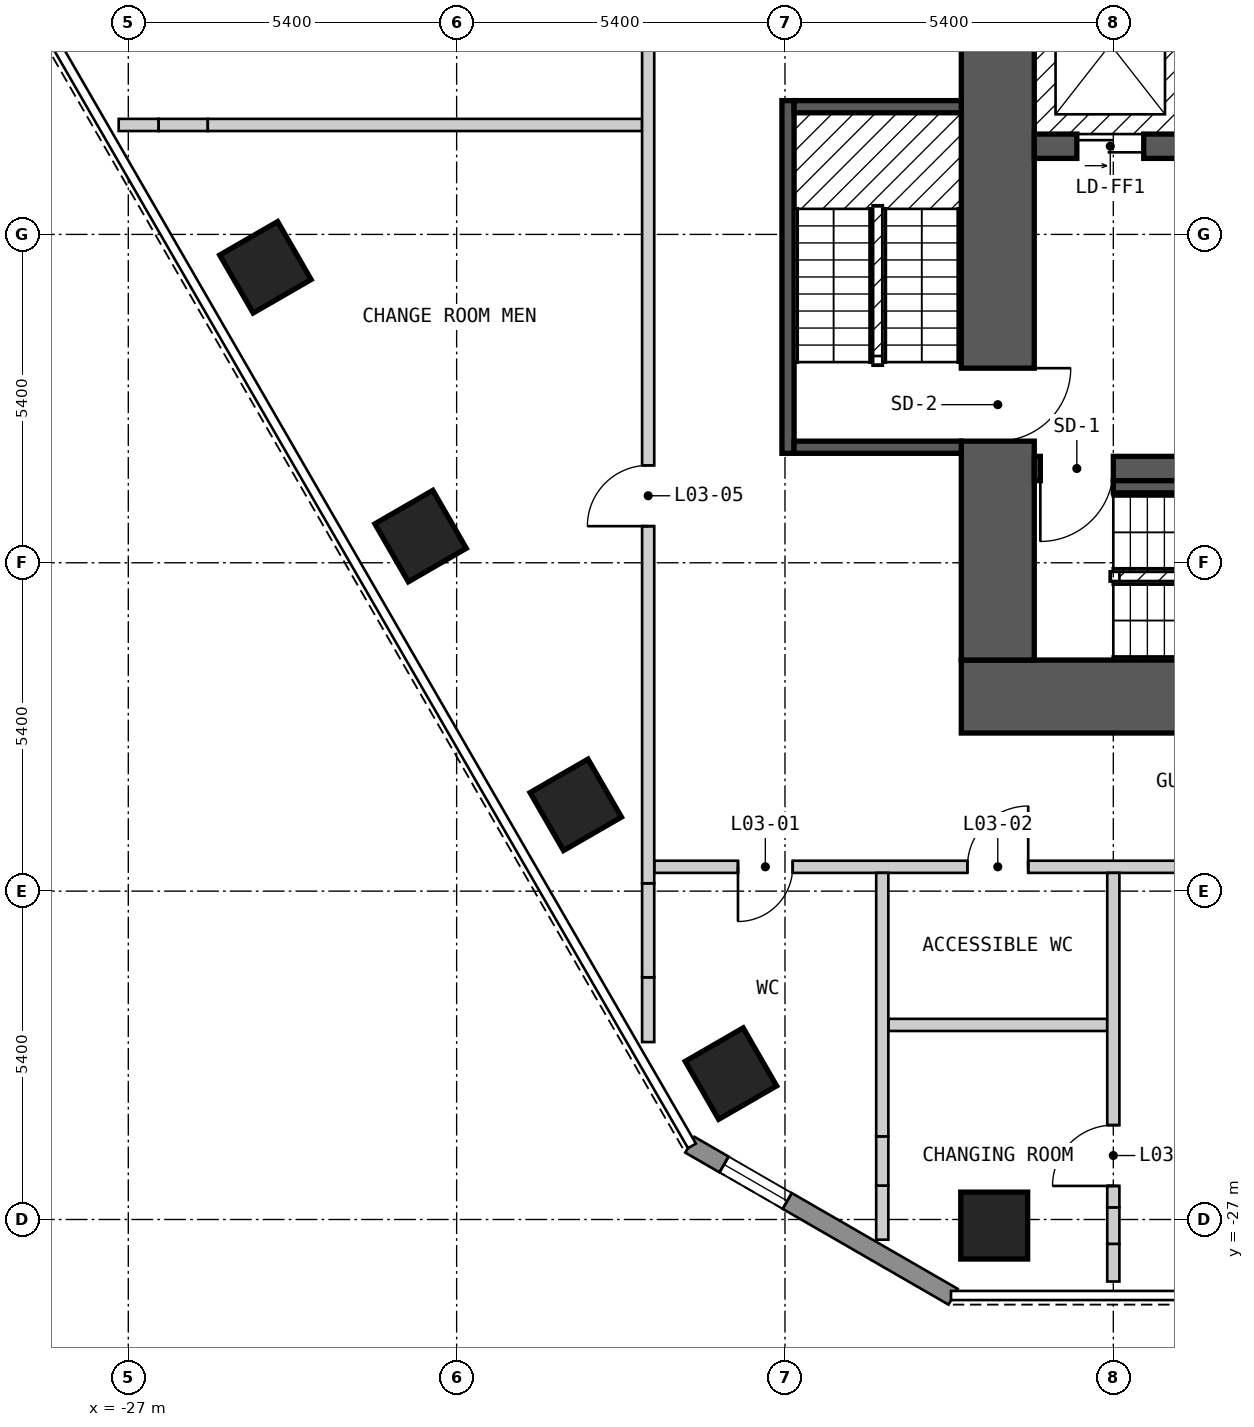
"""IFC4 building model, lengths in metres.
Left out: names, types, materials, properties, quantities, classifications, styles, units other than length and angle.
Written with IfcOpenShell. Run it as: python <this file> out.ifc"""

import sys

from ifc_helpers import new_model, si_unit, direction, frame, frame_2d, origin, origin_2d, place, context, subcontext, project, spatial, polyline, rectangle, outline, extrude, element, fill, save


model = new_model("IFC4")
c1 = context("Model", 3, precision=1e-05, world=origin(), true_north=direction((0.0, 1.0)))
c2 = subcontext(c1, "Body", "Model", "MODEL_VIEW")
j1 = project(units=[si_unit("LENGTHUNIT", "METRE"), si_unit("PLANEANGLEUNIT", "RADIAN")], contexts=[c1])
p1 = place(None, origin())
s1 = spatial("IfcSite", under=j1, at=p1, CompositionType="ELEMENT")
p2 = place(p1, origin())
s2 = spatial("IfcBuilding", under=s1, at=p2, CompositionType="ELEMENT")
p3 = place(p2, frame((0.0, 0.0, 12.6)))
s3 = spatial("IfcBuildingStorey", under=s2, at=p3, CompositionType="ELEMENT", Elevation=12.6)
for number, where, z_axis, x_axis in (
    (1, (-24.745, -11.341, 0.0), (0.0, 0.0, 1.0), (0.5, -0.866, 0.0)),
    (2, (-22.193, -15.761, 0.0), (0.0, 0.0, 1.0), (0.5, -0.866, 0.0)),
    (3, (-19.641, -20.181, 0.0), (0.0, 0.0, 1.0), (0.5, -0.866, 0.0)),
    (4, (-17.089, -24.601, 0.0), (0.0, 0.0, 1.0), (0.5, -0.866, 0.0)),
    (5, (-12.759, -27.1, 0.0), (0.0, 0.0, 1.0), (1.0, 0.0, 0.0)),
):
    element("IfcColumn", number, at=place(p3, frame(where, z_axis=z_axis, x_axis=x_axis)), inside=s3, PredefinedType="COLUMN", context=c2, shape_type="SweptSolid", body=[
        extrude(rectangle(XDim=1.1, YDim=1.1, at=origin_2d()), origin(), (0.0, 0.0, 1.0), 3.6),
    ])
p4 = place(p3, frame((-13.3, -18.4, 0.0), z_axis=(0.0, 0.0, 1.0), x_axis=(1.0, 0.0, 0.0)))
e6 = element("IfcWall", 6, at=p4, inside=s3, PredefinedType="SHEAR", context=c2, shape_type="SweptSolid", body=[
    extrude(rectangle(XDim=26.6, YDim=1.2, at=frame_2d((13.3, 0.0))), origin(), (0.0, 0.0, 1.0), 3.25),
])
p5 = place(p3, frame((-12.7, -17.8, 0.0), z_axis=(0.0, 0.0, 1.0), x_axis=(0.0, 1.0, 0.0)))
e7 = element("IfcWall", 7, at=p5, inside=s3, PredefinedType="SHEAR", context=c2, shape_type="SweptSolid", body=[
    extrude(rectangle(XDim=11.6, YDim=1.2, at=frame_2d((5.8, 0.0))), origin(), (0.0, 0.0, 1.0), 3.25),
])
p6 = place(p5, frame((3.6, 0.0, 0.0)))
e8 = element("IfcOpeningElement", 8, at=p6, cuts=e7, PredefinedType="OPENING", context=c2, shape_type="SweptSolid", body=[
    extrude(rectangle(XDim=1.2, YDim=2.1, at=frame_2d((0.6, 1.05))), frame((0.0, 0.61, 0.0), z_axis=(0.0, -1.0, 0.0), x_axis=(1.0, 0.0, 0.0)), (0.0, 0.0, 1.0), 1.22),
])
p7 = place(p3, frame((-12.1, -14.65, 0.0), z_axis=(0.0, 0.0, 1.0), x_axis=(1.0, 0.0, 0.0)))
e9 = element("IfcWall", 9, at=p7, inside=s3, PredefinedType="SHEAR", context=c2, shape_type="SweptSolid", body=[
    extrude(rectangle(XDim=24.2, YDim=0.4, at=frame_2d((12.1, 0.0))), origin(), (0.0, 0.0, 1.0), 3.25),
])
p8 = place(p7, frame((1.3, 0.0, 0.0), z_axis=(0.0, 0.0, 1.0), x_axis=(-1.0, 0.0, 0.0)))
e10 = element("IfcOpeningElement", 10, at=p8, cuts=e9, PredefinedType="OPENING", context=c2, shape_type="SweptSolid", body=[
    extrude(rectangle(XDim=1.2, YDim=2.1, at=frame_2d((0.6, 1.05))), frame((0.0, 0.21, 0.0), z_axis=(0.0, -1.0, 0.0), x_axis=(1.0, 0.0, 0.0)), (0.0, 0.0, 1.0), 0.42),
])
p9 = place(p7, frame((24.15, 0.0, 0.0), z_axis=(0.0, 0.0, 1.0), x_axis=(-1.0, 0.0, 0.0)))
e11 = element("IfcOpeningElement", 11, at=p9, cuts=e9, PredefinedType="OPENING", context=c2, shape_type="SweptSolid", body=[
    extrude(rectangle(XDim=1.2, YDim=2.1, at=frame_2d((0.6, 1.05))), frame((0.0, 0.21, 0.0), z_axis=(0.0, -1.0, 0.0), x_axis=(1.0, 0.0, 0.0)), (0.0, 0.0, 1.0), 0.42),
])
p10 = place(p7, frame((17.2, 0.0, 0.0), z_axis=(0.0, 0.0, 1.0), x_axis=(-1.0, 0.0, 0.0)))
e12 = element("IfcOpeningElement", 12, at=p10, cuts=e9, PredefinedType="OPENING", context=c2, shape_type="SweptSolid", body=[
    extrude(rectangle(XDim=1.0, YDim=2.1, at=frame_2d((0.5, 1.05))), frame((0.0, 0.21, 0.0), z_axis=(0.0, -1.0, 0.0), x_axis=(1.0, 0.0, 0.0)), (0.0, 0.0, 1.0), 0.42),
])
p11 = place(p3, frame((-12.1, -9.35, 0.0), z_axis=(0.0, 0.0, 1.0), x_axis=(1.0, 0.0, 0.0)))
e13 = element("IfcWall", 13, at=p11, inside=s3, PredefinedType="SHEAR", context=c2, shape_type="SweptSolid", body=[
    extrude(rectangle(XDim=22.3, YDim=0.4, at=frame_2d((11.15, 0.0))), origin(), (0.0, 0.0, 1.0), 3.25),
])
p12 = place(p11, frame((0.7, 0.0, 0.0)))
e14 = element("IfcOpeningElement", 14, at=p12, cuts=e13, PredefinedType="OPENING", context=c2, shape_type="SweptSolid", body=[
    extrude(rectangle(XDim=1.1, YDim=2.1, at=frame_2d((0.55, 1.05))), frame((0.0, 0.21, 0.0), z_axis=(0.0, -1.0, 0.0), x_axis=(1.0, 0.0, 0.0)), (0.0, 0.0, 1.0), 0.42),
])
p13 = place(p11, frame((3.5, 0.0, 0.0)))
e15 = element("IfcOpeningElement", 15, at=p13, cuts=e13, PredefinedType="OPENING", context=c2, shape_type="SweptSolid", body=[
    extrude(rectangle(XDim=1.1, YDim=2.1, at=frame_2d((0.55, 1.05))), frame((0.0, 0.21, 0.0), z_axis=(0.0, -1.0, 0.0), x_axis=(1.0, 0.0, 0.0)), (0.0, 0.0, 1.0), 0.42),
])
p14 = place(p11, frame((6.3, 0.0, 0.0)))
e16 = element("IfcOpeningElement", 16, at=p14, cuts=e13, PredefinedType="OPENING", context=c2, shape_type="SweptSolid", body=[
    extrude(rectangle(XDim=1.1, YDim=2.1, at=frame_2d((0.55, 1.05))), frame((0.0, 0.21, 0.0), z_axis=(0.0, -1.0, 0.0), x_axis=(1.0, 0.0, 0.0)), (0.0, 0.0, 1.0), 0.42),
])
p15 = place(p11, frame((8.6, 0.0, 0.0)))
e17 = element("IfcOpeningElement", 17, at=p15, cuts=e13, PredefinedType="OPENING", context=c2, shape_type="SweptSolid", body=[
    extrude(rectangle(XDim=1.1, YDim=2.1, at=frame_2d((0.55, 1.05))), frame((0.0, 0.21, 0.0), z_axis=(0.0, -1.0, 0.0), x_axis=(1.0, 0.0, 0.0)), (0.0, 0.0, 1.0), 0.42),
])
p16 = place(p11, frame((10.9, 0.0, 0.0)))
e18 = element("IfcOpeningElement", 18, at=p16, cuts=e13, PredefinedType="OPENING", context=c2, shape_type="SweptSolid", body=[
    extrude(rectangle(XDim=1.1, YDim=2.1, at=frame_2d((0.55, 1.05))), frame((0.0, 0.21, 0.0), z_axis=(0.0, -1.0, 0.0), x_axis=(1.0, 0.0, 0.0)), (0.0, 0.0, 1.0), 0.42),
])
p17 = place(p11, frame((13.2, 0.0, 0.0)))
e19 = element("IfcOpeningElement", 19, at=p17, cuts=e13, PredefinedType="OPENING", context=c2, shape_type="SweptSolid", body=[
    extrude(rectangle(XDim=1.1, YDim=2.1, at=frame_2d((0.55, 1.05))), frame((0.0, 0.21, 0.0), z_axis=(0.0, -1.0, 0.0), x_axis=(1.0, 0.0, 0.0)), (0.0, 0.0, 1.0), 0.42),
])
p18 = place(p11, frame((15.5, 0.0, 0.0)))
e20 = element("IfcOpeningElement", 20, at=p18, cuts=e13, PredefinedType="OPENING", context=c2, shape_type="SweptSolid", body=[
    extrude(rectangle(XDim=1.1, YDim=2.1, at=frame_2d((0.55, 1.05))), frame((0.0, 0.21, 0.0), z_axis=(0.0, -1.0, 0.0), x_axis=(1.0, 0.0, 0.0)), (0.0, 0.0, 1.0), 0.42),
])
p19 = place(p11, frame((17.8, 0.0, 0.0)))
e21 = element("IfcOpeningElement", 21, at=p19, cuts=e13, PredefinedType="OPENING", context=c2, shape_type="SweptSolid", body=[
    extrude(rectangle(XDim=1.1, YDim=2.1, at=frame_2d((0.55, 1.05))), frame((0.0, 0.21, 0.0), z_axis=(0.0, -1.0, 0.0), x_axis=(1.0, 0.0, 0.0)), (0.0, 0.0, 1.0), 0.42),
])
p20 = place(p11, frame((20.2, 0.0, 0.0)))
e22 = element("IfcOpeningElement", 22, at=p20, cuts=e13, PredefinedType="OPENING", context=c2, shape_type="SweptSolid", body=[
    extrude(rectangle(XDim=1.1, YDim=2.1, at=frame_2d((0.55, 1.05))), frame((0.0, 0.21, 0.0), z_axis=(0.0, -1.0, 0.0), x_axis=(1.0, 0.0, 0.0)), (0.0, 0.0, 1.0), 0.42),
])
p21 = place(p3, frame((-17.765, -25.77, 0.0), z_axis=(0.0, 0.0, 1.0), x_axis=(0.866010750942, -0.50002537861, 0.0)))
e23 = element("IfcWall", 23, at=p21, inside=s3, PredefinedType="SOLIDWALL", context=c2, shape_type="SweptSolid", body=[
    extrude(outline(polyline([(0.0, -0.15), (5.0, -0.15), (4.919, 0.15), (0.08, 0.15), (0.0, -0.15)])), origin(), (0.0, 0.0, 1.0), 3.25),
])
p22 = place(p21, frame((0.65, 0.0, 0.15)))
e24 = element("IfcOpeningElement", 24, at=p22, cuts=e23, PredefinedType="OPENING", context=c2, shape_type="SweptSolid", body=[
    extrude(rectangle(XDim=1.2, YDim=2.1, at=frame_2d((0.6, 1.05))), frame((0.0, 0.16, 0.0), z_axis=(0.0, -1.0, 0.0), x_axis=(1.0, 0.0, 0.0)), (0.0, 0.0, 1.0), 0.32),
])
p23 = place(p3, frame((-14.5, -23.8, 0.0), z_axis=(0.0, 0.0, 1.0), x_axis=(1.0, 0.0, 0.0)))
e25 = element("IfcWall", 25, at=p23, inside=s3, PredefinedType="PARTITIONING", context=c2, shape_type="SweptSolid", body=[
    extrude(rectangle(XDim=3.6, YDim=0.2, at=frame_2d((1.8, 0.0))), origin(), (0.0, 0.0, 1.0), 3.25),
])
p24 = place(p3, frame((-18.35, -21.2, 0.0), z_axis=(0.0, 0.0, 1.0), x_axis=(1.0, 0.0, 0.0)))
e26 = element("IfcWall", 26, at=p24, inside=s3, PredefinedType="PARTITIONING", context=c2, shape_type="SweptSolid", body=[
    extrude(rectangle(XDim=24.1, YDim=0.2, at=frame_2d((12.05, 0.0))), origin(), (0.0, 0.0, 1.0), 3.25),
])
p25 = place(p24, frame((2.277, 0.0, 0.0), z_axis=(0.0, 0.0, 1.0), x_axis=(-1.0, 0.0, 0.0)))
e27 = element("IfcOpeningElement", 27, at=p25, cuts=e26, PredefinedType="OPENING", context=c2, shape_type="SweptSolid", body=[
    extrude(rectangle(XDim=0.9, YDim=2.1, at=frame_2d((0.45, 1.05))), frame((0.0, 0.11, 0.0), z_axis=(0.0, -1.0, 0.0), x_axis=(1.0, 0.0, 0.0)), (0.0, 0.0, 1.0), 0.22),
])
p26 = place(p24, frame((6.15, 0.0, 0.0), z_axis=(0.0, 0.0, 1.0), x_axis=(-1.0, 0.0, 0.0)))
e28 = element("IfcOpeningElement", 28, at=p26, cuts=e26, PredefinedType="OPENING", context=c2, shape_type="SweptSolid", body=[
    extrude(rectangle(XDim=1.0, YDim=2.1, at=frame_2d((0.5, 1.05))), frame((0.0, 0.11, 0.0), z_axis=(0.0, -1.0, 0.0), x_axis=(1.0, 0.0, 0.0)), (0.0, 0.0, 1.0), 0.22),
])
p27 = place(p24, frame((14.923, 0.0, 0.0)))
e29 = element("IfcOpeningElement", 29, at=p27, cuts=e26, PredefinedType="OPENING", context=c2, shape_type="SweptSolid", body=[
    extrude(rectangle(XDim=1.8, YDim=2.1, at=frame_2d((0.9, 1.05))), frame((0.0, 0.11, 0.0), z_axis=(0.0, -1.0, 0.0), x_axis=(1.0, 0.0, 0.0)), (0.0, 0.0, 1.0), 0.22),
])
p28 = place(p3, frame((-27.158, -9.0, 0.0), z_axis=(0.0, 0.0, 1.0), x_axis=(1.0, 0.0, 0.0)))
e30 = element("IfcWall", 30, at=p28, inside=s3, PredefinedType="PARTITIONING", context=c2, shape_type="SweptSolid", body=[
    extrude(rectangle(XDim=0.657, YDim=0.2, at=frame_2d((0.329, 0.0))), origin(), (0.0, 0.0, 1.0), 3.25),
])
p29 = place(p3, frame((-26.501, -9.0, 0.0), z_axis=(0.0, 0.0, 1.0), x_axis=(1.0, 0.0, 0.0)))
e31 = element("IfcWall", 31, at=p29, inside=s3, PredefinedType="PARTITIONING", context=c2, shape_type="SweptSolid", body=[
    extrude(rectangle(XDim=0.809, YDim=0.2, at=frame_2d((0.405, 0.0))), origin(), (0.0, 0.0, 1.0), 2.52),
])
p30 = place(p3, frame((-25.692, -9.0, 0.0), z_axis=(0.0, 0.0, 1.0), x_axis=(1.0, 0.0, 0.0)))
e32 = element("IfcWall", 32, at=p30, inside=s3, PredefinedType="PARTITIONING", context=c2, shape_type="SweptSolid", body=[
    extrude(rectangle(XDim=7.142, YDim=0.2, at=frame_2d((3.571, 0.0))), origin(), (0.0, 0.0, 1.0), 3.25),
])
p31 = place(p3, frame((-18.45, -24.082, 0.0), z_axis=(0.0, 0.0, 1.0), x_axis=(0.0, 1.0, 0.0)))
e33 = element("IfcWall", 33, at=p31, inside=s3, PredefinedType="PARTITIONING", context=c2, shape_type="SweptSolid", body=[
    extrude(rectangle(XDim=1.065, YDim=0.2, at=frame_2d((0.532, 0.0))), origin(), (0.0, 0.0, 1.0), 3.25),
])
p32 = place(p3, frame((-18.45, -23.017, 0.0), z_axis=(0.0, 0.0, 1.0), x_axis=(0.0, 1.0, 0.0)))
e34 = element("IfcWall", 34, at=p32, inside=s3, PredefinedType="PARTITIONING", context=c2, shape_type="SweptSolid", body=[
    extrude(rectangle(XDim=1.546, YDim=0.2, at=frame_2d((0.773, 0.0))), origin(), (0.0, 0.0, 1.0), 2.52),
])
p33 = place(p3, frame((-18.45, -21.471, 0.0), z_axis=(0.0, 0.0, 1.0), x_axis=(0.0, 1.0, 0.0)))
e35 = element("IfcWall", 35, at=p33, inside=s3, PredefinedType="PARTITIONING", context=c2, shape_type="SweptSolid", body=[
    extrude(rectangle(XDim=23.371, YDim=0.2, at=frame_2d((11.686, 0.0))), origin(), (0.0, 0.0, 1.0), 3.25),
])
p34 = place(p33, frame((5.873, 0.0, 0.0)))
e36 = element("IfcOpeningElement", 36, at=p34, cuts=e35, PredefinedType="OPENING", context=c2, shape_type="SweptSolid", body=[
    extrude(rectangle(XDim=1.0, YDim=2.1, at=frame_2d((0.5, 1.05))), frame((0.0, 0.11, 0.0), z_axis=(0.0, -1.0, 0.0), x_axis=(1.0, 0.0, 0.0)), (0.0, 0.0, 1.0), 0.22),
])
p35 = place(p33, frame((17.469, 0.0, 0.0)))
e37 = element("IfcOpeningElement", 37, at=p35, cuts=e35, PredefinedType="OPENING", context=c2, shape_type="SweptSolid", body=[
    extrude(rectangle(XDim=1.0, YDim=2.1, at=frame_2d((0.5, 1.05))), frame((0.0, 0.11, 0.0), z_axis=(0.0, -1.0, 0.0), x_axis=(1.0, 0.0, 0.0)), (0.0, 0.0, 1.0), 0.22),
])
p36 = place(p3, frame((-14.6, -27.332, 0.0), z_axis=(0.0, 0.0, 1.0), x_axis=(0.0, 1.0, 0.0)))
e38 = element("IfcWall", 38, at=p36, inside=s3, PredefinedType="PARTITIONING", context=c2, shape_type="SweptSolid", body=[
    extrude(rectangle(XDim=0.89, YDim=0.2, at=frame_2d((0.445, 0.0))), origin(), (0.0, 0.0, 1.0), 3.25),
])
p37 = place(p3, frame((-14.6, -26.442, 0.0), z_axis=(0.0, 0.0, 1.0), x_axis=(0.0, 1.0, 0.0)))
e39 = element("IfcWall", 39, at=p37, inside=s3, PredefinedType="PARTITIONING", context=c2, shape_type="SweptSolid", body=[
    extrude(rectangle(XDim=0.809, YDim=0.2, at=frame_2d((0.404, 0.0))), origin(), (0.0, 0.0, 1.0), 2.52),
])
p38 = place(p3, frame((-14.6, -25.633, 0.0), z_axis=(0.0, 0.0, 1.0), x_axis=(0.0, 1.0, 0.0)))
e40 = element("IfcWall", 40, at=p38, inside=s3, PredefinedType="PARTITIONING", context=c2, shape_type="SweptSolid", body=[
    extrude(rectangle(XDim=4.333, YDim=0.2, at=frame_2d((2.167, 0.0))), origin(), (0.0, 0.0, 1.0), 3.25),
])
p39 = place(p3, frame((-10.8, -28.02, 0.0), z_axis=(0.0, 0.0, 1.0), x_axis=(0.0, 1.0, 0.0)))
e41 = element("IfcWall", 41, at=p39, inside=s3, PredefinedType="PARTITIONING", context=c2, shape_type="SweptSolid", body=[
    extrude(rectangle(XDim=0.62, YDim=0.2, at=frame_2d((0.31, 0.0))), origin(), (0.0, 0.0, 1.0), 3.25),
])
p40 = place(p3, frame((-10.8, -27.4, 0.0), z_axis=(0.0, 0.0, 1.0), x_axis=(0.0, 1.0, 0.0)))
e42 = element("IfcWall", 42, at=p40, inside=s3, PredefinedType="PARTITIONING", context=c2, shape_type="SweptSolid", body=[
    extrude(rectangle(XDim=0.6, YDim=0.2, at=frame_2d((0.3, 0.0))), origin(), (0.0, 0.0, 1.0), 2.52),
])
p41 = place(p3, frame((-10.8, -26.8, 0.0), z_axis=(0.0, 0.0, 1.0), x_axis=(0.0, 1.0, 0.0)))
e43 = element("IfcWall", 43, at=p41, inside=s3, PredefinedType="PARTITIONING", context=c2, shape_type="SweptSolid", body=[
    extrude(rectangle(XDim=5.5, YDim=0.2, at=frame_2d((2.75, 0.0))), origin(), (0.0, 0.0, 1.0), 3.25),
])
p42 = place(p41, frame((0.352, 0.0, 0.0)))
e44 = element("IfcOpeningElement", 44, at=p42, cuts=e43, PredefinedType="OPENING", context=c2, shape_type="SweptSolid", body=[
    extrude(rectangle(XDim=1.0, YDim=2.1, at=frame_2d((0.5, 1.05))), frame((0.0, 0.11, 0.0), z_axis=(0.0, -1.0, 0.0), x_axis=(1.0, 0.0, 0.0)), (0.0, 0.0, 1.0), 0.22),
])
p43 = place(p3, frame((-16.15, -14.4, 0.0), z_axis=(0.0, 0.0, 1.0), x_axis=(0.0, 1.0, 0.0)))
e45 = element("IfcWall", 45, at=p43, inside=s3, PredefinedType="SOLIDWALL", context=c2, shape_type="SweptSolid", body=[
    extrude(rectangle(XDim=5.8, YDim=0.2, at=frame_2d((2.9, 0.0))), origin(), (0.0, 0.0, 1.0), 3.25),
])
for number, where, z_axis, x_axis in (
    (46, (-16.05, -14.3, 0.0), (0.0, 0.0, 1.0), (1.0, 0.0, 0.0)),
    (47, (-16.05, -8.7, 0.0), (0.0, 0.0, 1.0), (1.0, 0.0, 0.0)),
):
    element("IfcWall", number, at=place(p3, frame(where, z_axis=z_axis, x_axis=x_axis)), inside=s3, PredefinedType="SOLIDWALL", context=c2, shape_type="SweptSolid", body=[
        extrude(rectangle(XDim=2.75, YDim=0.2, at=frame_2d((1.375, 0.0))), origin(), (0.0, 0.0, 1.0), 3.25),
    ])
p44 = place(p3, frame((-10.8, -14.95, 0.0), z_axis=(0.0, 0.0, 1.0), x_axis=(1.0, 0.0, 0.0)))
e48 = element("IfcWall", 48, at=p44, inside=s3, PredefinedType="SOLIDWALL", context=c2, shape_type="SweptSolid", body=[
    extrude(rectangle(XDim=4.1, YDim=0.2, at=frame_2d((2.05, 0.0))), origin(), (0.0, 0.0, 1.0), 3.25),
])
p45 = place(p22, origin())
e49 = element("IfcWindow", 49, at=p45, inside=s3, PartitioningType="SINGLE_PANEL", PredefinedType="WINDOW", context=c2, shape_type="SweptSolid", body=[
    extrude(rectangle(XDim=1.2, YDim=2.1, at=frame_2d((0.6, 1.05))), frame((0.0, 0.03, 0.0), z_axis=(0.0, -1.0, 0.0), x_axis=(1.0, 0.0, 0.0)), (0.0, 0.0, 1.0), 0.06),
])
fill(e24, e49)
p46 = place(p25, origin())
e50 = element("IfcDoor", 50, at=p46, inside=s3, OperationType="SINGLE_SWING_RIGHT", PredefinedType="DOOR", context=c2, shape_type="SweptSolid", body=[
    extrude(rectangle(XDim=0.9, YDim=2.1, at=frame_2d((0.45, 1.05))), frame((0.0, 0.025, 0.0), z_axis=(0.0, -1.0, 0.0), x_axis=(1.0, 0.0, 0.0)), (0.0, 0.0, 1.0), 0.05),
])
fill(e27, e50)
p47 = place(p26, origin())
e51 = element("IfcDoor", 51, at=p47, inside=s3, OperationType="SINGLE_SWING_LEFT", PredefinedType="DOOR", context=c2, shape_type="SweptSolid", body=[
    extrude(rectangle(XDim=1.0, YDim=2.1, at=frame_2d((0.5, 1.05))), frame((0.0, 0.025, 0.0), z_axis=(0.0, -1.0, 0.0), x_axis=(1.0, 0.0, 0.0)), (0.0, 0.0, 1.0), 0.05),
])
fill(e28, e51)
p48 = place(p42, origin())
e52 = element("IfcDoor", 52, at=p48, inside=s3, OperationType="SINGLE_SWING_LEFT", PredefinedType="DOOR", context=c2, shape_type="SweptSolid", body=[
    extrude(rectangle(XDim=1.0, YDim=2.1, at=frame_2d((0.5, 1.05))), frame((0.0, 0.025, 0.0), z_axis=(0.0, -1.0, 0.0), x_axis=(1.0, 0.0, 0.0)), (0.0, 0.0, 1.0), 0.05),
])
fill(e44, e52)
p49 = place(p34, origin())
e53 = element("IfcDoor", 53, at=p49, inside=s3, OperationType="SINGLE_SWING_LEFT", PredefinedType="DOOR", context=c2, shape_type="SweptSolid", body=[
    extrude(rectangle(XDim=1.0, YDim=2.1, at=frame_2d((0.5, 1.05))), frame((0.0, 0.025, 0.0), z_axis=(0.0, -1.0, 0.0), x_axis=(1.0, 0.0, 0.0)), (0.0, 0.0, 1.0), 0.05),
])
fill(e36, e53)
p50 = place(p12, origin())
e54 = element("IfcDoor", 54, at=p50, inside=s3, OperationType="DOUBLE_DOOR_SLIDING", PredefinedType="DOOR", context=c2, shape_type="SweptSolid", body=[
    extrude(rectangle(XDim=1.1, YDim=2.1, at=frame_2d((0.55, 1.05))), frame((0.0, 0.025, 0.0), z_axis=(0.0, -1.0, 0.0), x_axis=(1.0, 0.0, 0.0)), (0.0, 0.0, 1.0), 0.05),
])
fill(e14, e54)
p51 = place(p8, origin())
e55 = element("IfcDoor", 55, at=p51, inside=s3, OperationType="SINGLE_SWING_RIGHT", PredefinedType="DOOR", context=c2, shape_type="SweptSolid", body=[
    extrude(rectangle(XDim=1.2, YDim=2.1, at=frame_2d((0.6, 1.05))), frame((0.0, 0.025, 0.0), z_axis=(0.0, -1.0, 0.0), x_axis=(1.0, 0.0, 0.0)), (0.0, 0.0, 1.0), 0.05),
])
fill(e10, e55)
p52 = place(p6, origin())
e56 = element("IfcDoor", 56, at=p52, inside=s3, OperationType="SINGLE_SWING_RIGHT", PredefinedType="DOOR", context=c2, shape_type="SweptSolid", body=[
    extrude(rectangle(XDim=1.2, YDim=2.1, at=frame_2d((0.6, 1.05))), frame((0.0, 0.025, 0.0), z_axis=(0.0, -1.0, 0.0), x_axis=(1.0, 0.0, 0.0)), (0.0, 0.0, 1.0), 0.05),
])
fill(e8, e56)
save(model, sys.argv[1])
